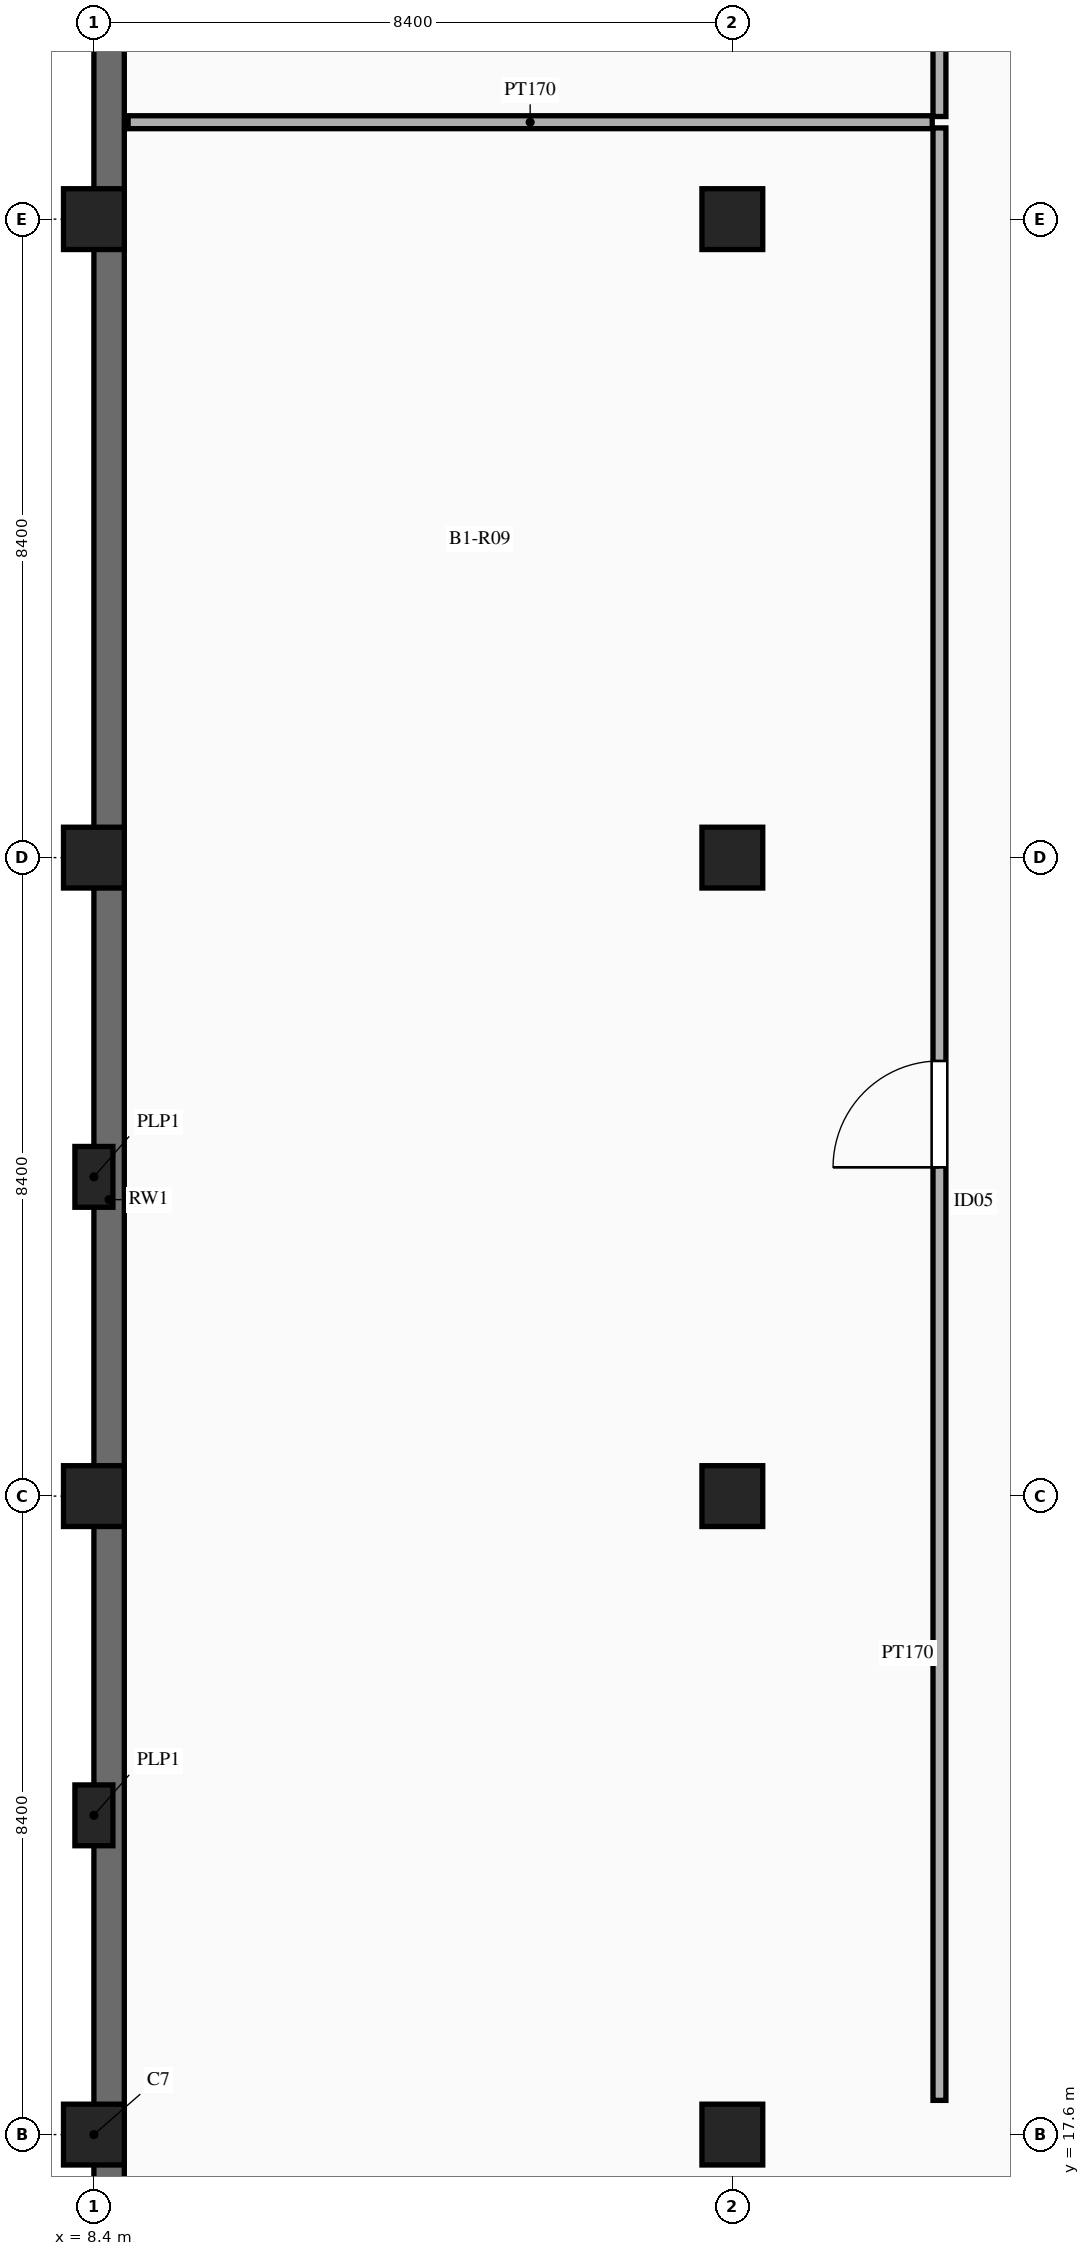
"""IFC4 building model, lengths in metres.
Left out: names, types, materials, properties, quantities, classifications, styles, units other than length and angle.
Written with IfcOpenShell. Run it as: python <this file> out.ifc"""

import sys

from ifc_helpers import new_model, si_unit, direction, frame, frame_2d, origin, origin_2d, place, context, subcontext, project, spatial, rectangle, extrude, element, fill, save


model = new_model("IFC4")
c1 = context("Model", 3, precision=1e-05, world=origin(), true_north=direction((0.0, 1.0)))
c2 = subcontext(c1, "Body", "Model", "MODEL_VIEW")
j1 = project(units=[si_unit("LENGTHUNIT", "METRE"), si_unit("PLANEANGLEUNIT", "RADIAN")], contexts=[c1])
p1 = place(None, origin())
s1 = spatial("IfcSite", under=j1, at=p1, CompositionType="ELEMENT")
p2 = place(p1, origin())
s2 = spatial("IfcBuilding", under=s1, at=p2, CompositionType="ELEMENT")
p3 = place(p2, frame((0.0, 0.0, -4.5)))
s3 = spatial("IfcBuildingStorey", under=s2, at=p3, CompositionType="ELEMENT", Elevation=-4.5)
for number, where, z_axis, x_axis in (
    (1, (8.4, 17.6, 0.0), (0.0, 0.0, 1.0), (1.0, 0.0, 0.0)),
    (2, (8.4, 26.0, 0.0), (0.0, 0.0, 1.0), (1.0, 0.0, 0.0)),
    (3, (8.4, 34.4, 0.0), (0.0, 0.0, 1.0), (1.0, 0.0, 0.0)),
    (4, (8.4, 42.8, 0.0), (0.0, 0.0, 1.0), (1.0, 0.0, 0.0)),
    (5, (16.8, 17.6, 0.0), (0.0, 0.0, 1.0), (1.0, 0.0, 0.0)),
    (6, (16.8, 26.0, 0.0), (0.0, 0.0, 1.0), (1.0, 0.0, 0.0)),
    (7, (16.8, 34.4, 0.0), (0.0, 0.0, 1.0), (1.0, 0.0, 0.0)),
    (8, (16.8, 42.8, 0.0), (0.0, 0.0, 1.0), (1.0, 0.0, 0.0)),
):
    element("IfcColumn", number, at=place(p3, frame(where, z_axis=z_axis, x_axis=x_axis)), inside=s3, PredefinedType="COLUMN", context=c2, shape_type="SweptSolid", body=[
        extrude(rectangle(XDim=0.8, YDim=0.8, at=origin_2d()), origin(), (0.0, 0.0, 1.0), 4.5),
    ])
for number, where, z_axis, x_axis in (
    (9, (8.4, 21.8, 0.0), (0.0, 0.0, 1.0), (1.0, 0.0, 0.0)),
    (10, (8.4, 30.2, 0.0), (0.0, 0.0, 1.0), (1.0, 0.0, 0.0)),
):
    element("IfcColumn", number, at=place(p3, frame(where, z_axis=z_axis, x_axis=x_axis)), inside=s3, PredefinedType="PILASTER", context=c2, shape_type="SweptSolid", body=[
        extrude(rectangle(XDim=0.8, YDim=0.5, at=origin_2d()), origin(), (0.0, 0.0, 1.0), 4.5),
    ])
p4 = place(p3, frame((8.6, 120.4, 0.0), z_axis=(0.0, 0.0, 1.0), x_axis=(0.0, -1.0, 0.0)))
e11 = element("IfcWall", 11, at=p4, inside=s3, PredefinedType="USERDEFINED", context=c2, shape_type="SweptSolid", body=[
    extrude(rectangle(XDim=109.4, YDim=0.4, at=frame_2d((54.7, 0.0))), origin(), (0.0, 0.0, 1.0), 4.5),
])
p5 = place(p3, frame((19.525, 18.05, 0.0), z_axis=(0.0, 0.0, 1.0), x_axis=(0.0, 1.0, 0.0)))
e12 = element("IfcWall", 12, at=p5, inside=s3, PredefinedType="PARTITIONING", context=c2, shape_type="SweptSolid", body=[
    extrude(rectangle(XDim=25.95, YDim=0.17, at=frame_2d((12.975, 0.0))), origin(), (0.0, 0.0, 1.0), 3.45),
])
p6 = place(p5, frame((12.275, 0.0, 0.0)))
e13 = element("IfcOpeningElement", 13, at=p6, cuts=e12, PredefinedType="OPENING", context=c2, shape_type="SweptSolid", body=[
    extrude(rectangle(XDim=1.4, YDim=2.25, at=frame_2d((0.7, 1.125))), frame((0.0, 0.095, 0.0), z_axis=(0.0, -1.0, 0.0), x_axis=(1.0, 0.0, 0.0)), (0.0, 0.0, 1.0), 0.19),
])
p7 = place(p3, frame((19.525, 44.15, 0.0), z_axis=(0.0, 0.0, 1.0), x_axis=(0.0, 1.0, 0.0)))
e14 = element("IfcWall", 14, at=p7, inside=s3, PredefinedType="PARTITIONING", context=c2, shape_type="SweptSolid", body=[
    extrude(rectangle(XDim=30.2, YDim=0.17, at=frame_2d((15.1, 0.0))), origin(), (0.0, 0.0, 1.0), 3.45),
])
p8 = place(p7, frame((16.272, 0.0, 0.0)))
e15 = element("IfcOpeningElement", 15, at=p8, cuts=e14, PredefinedType="OPENING", context=c2, shape_type="SweptSolid", body=[
    extrude(rectangle(XDim=1.4, YDim=2.25, at=frame_2d((0.7, 1.125))), frame((0.0, 0.095, 0.0), z_axis=(0.0, -1.0, 0.0), x_axis=(1.0, 0.0, 0.0)), (0.0, 0.0, 1.0), 0.19),
])
p9 = place(p3, frame((8.85, 44.075, 0.0), z_axis=(0.0, 0.0, 1.0), x_axis=(1.0, 0.0, 0.0)))
e16 = element("IfcWall", 16, at=p9, inside=s3, PredefinedType="PARTITIONING", context=c2, shape_type="SweptSolid", body=[
    extrude(rectangle(XDim=10.58, YDim=0.17, at=frame_2d((5.29, 0.0))), origin(), (0.0, 0.0, 1.0), 3.45),
])
p10 = place(p6, origin())
e17 = element("IfcDoor", 17, at=p10, inside=s3, OperationType="SINGLE_SWING_LEFT", PredefinedType="DOOR", context=c2, shape_type="SweptSolid", body=[
    extrude(rectangle(XDim=1.4, YDim=2.25, at=frame_2d((0.7, 1.125))), frame((0.0, 0.025, 0.0), z_axis=(0.0, -1.0, 0.0), x_axis=(1.0, 0.0, 0.0)), (0.0, 0.0, 1.0), 0.05),
])
fill(e13, e17)
save(model, sys.argv[1])
